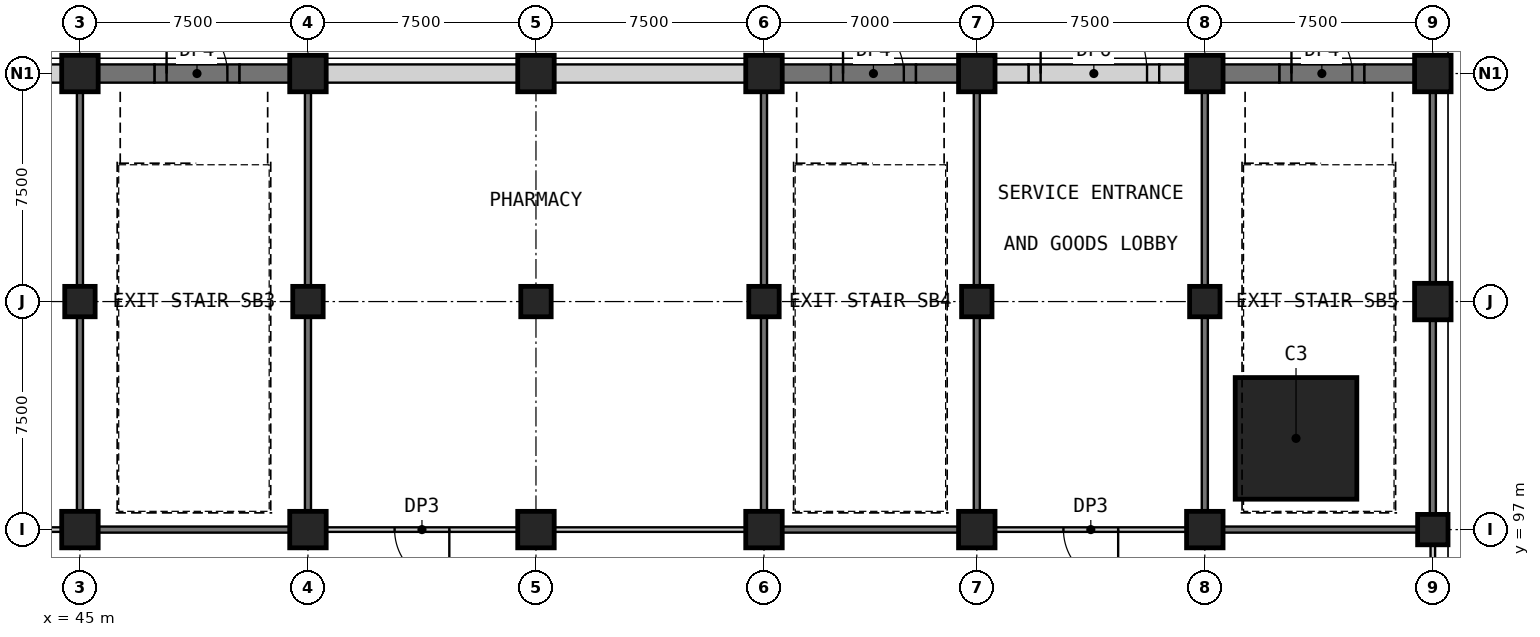
"""IFC4 building model, lengths in metres.
Left out: names, types, materials, properties, quantities, classifications, styles, units other than length and angle.
Written with IfcOpenShell. Run it as: python <this file> out.ifc"""

import sys

from ifc_helpers import new_model, si_unit, direction, frame, frame_2d, origin, origin_2d, place, context, subcontext, project, spatial, rectangle, extrude, element, fill, save


model = new_model("IFC4")
c1 = context("Model", 3, precision=1e-05, world=origin(), true_north=direction((0.0, 1.0)))
c2 = subcontext(c1, "Body", "Model", "MODEL_VIEW")
j1 = project(units=[si_unit("LENGTHUNIT", "METRE"), si_unit("PLANEANGLEUNIT", "RADIAN")], contexts=[c1])
p1 = place(None, origin())
s1 = spatial("IfcSite", under=j1, at=p1, CompositionType="ELEMENT")
p2 = place(p1, origin())
s2 = spatial("IfcBuilding", under=s1, at=p2, CompositionType="ELEMENT")
p3 = place(p2, origin())
s3 = spatial("IfcBuildingStorey", under=s2, at=p3, CompositionType="ELEMENT", Elevation=0.0)
p4 = place(p3, frame((45.0, 97.0, 0.0), z_axis=(0.0, 0.0, 1.0), x_axis=(1.0, 0.0, 0.0)))
e1 = element("IfcColumn", 1, at=p4, inside=s3, PredefinedType="COLUMN", context=c2, shape_type="SweptSolid", body=[
    extrude(rectangle(XDim=1.2, YDim=1.2, at=origin_2d()), origin(), (0.0, 0.0, 1.0), 8.0),
])
p5 = place(p3, frame((45.0, 104.5, 0.0), z_axis=(0.0, 0.0, 1.0), x_axis=(1.0, 0.0, 0.0)))
e2 = element("IfcColumn", 2, at=p5, inside=s3, PredefinedType="COLUMN", context=c2, shape_type="SweptSolid", body=[
    extrude(rectangle(XDim=1.0, YDim=1.0, at=origin_2d()), origin(), (0.0, 0.0, 1.0), 8.0),
])
p6 = place(p3, frame((52.5, 97.0, 0.0), z_axis=(0.0, 0.0, 1.0), x_axis=(1.0, 0.0, 0.0)))
e3 = element("IfcColumn", 3, at=p6, inside=s3, PredefinedType="COLUMN", context=c2, shape_type="SweptSolid", body=[
    extrude(rectangle(XDim=1.2, YDim=1.2, at=origin_2d()), origin(), (0.0, 0.0, 1.0), 8.0),
])
p7 = place(p3, frame((52.5, 104.5, 0.0), z_axis=(0.0, 0.0, 1.0), x_axis=(1.0, 0.0, 0.0)))
e4 = element("IfcColumn", 4, at=p7, inside=s3, PredefinedType="COLUMN", context=c2, shape_type="SweptSolid", body=[
    extrude(rectangle(XDim=1.0, YDim=1.0, at=origin_2d()), origin(), (0.0, 0.0, 1.0), 8.0),
])
p8 = place(p3, frame((60.0, 97.0, 0.0), z_axis=(0.0, 0.0, 1.0), x_axis=(1.0, 0.0, 0.0)))
e5 = element("IfcColumn", 5, at=p8, inside=s3, PredefinedType="COLUMN", context=c2, shape_type="SweptSolid", body=[
    extrude(rectangle(XDim=1.2, YDim=1.2, at=origin_2d()), origin(), (0.0, 0.0, 1.0), 8.0),
])
p9 = place(p3, frame((60.0, 104.5, 0.0), z_axis=(0.0, 0.0, 1.0), x_axis=(1.0, 0.0, 0.0)))
e6 = element("IfcColumn", 6, at=p9, inside=s3, PredefinedType="COLUMN", context=c2, shape_type="SweptSolid", body=[
    extrude(rectangle(XDim=1.0, YDim=1.0, at=origin_2d()), origin(), (0.0, 0.0, 1.0), 8.0),
])
p10 = place(p3, frame((67.5, 97.0, 0.0), z_axis=(0.0, 0.0, 1.0), x_axis=(1.0, 0.0, 0.0)))
e7 = element("IfcColumn", 7, at=p10, inside=s3, PredefinedType="COLUMN", context=c2, shape_type="SweptSolid", body=[
    extrude(rectangle(XDim=1.2, YDim=1.2, at=origin_2d()), origin(), (0.0, 0.0, 1.0), 8.0),
])
p11 = place(p3, frame((67.5, 104.5, 0.0), z_axis=(0.0, 0.0, 1.0), x_axis=(1.0, 0.0, 0.0)))
e8 = element("IfcColumn", 8, at=p11, inside=s3, PredefinedType="COLUMN", context=c2, shape_type="SweptSolid", body=[
    extrude(rectangle(XDim=1.0, YDim=1.0, at=origin_2d()), origin(), (0.0, 0.0, 1.0), 8.0),
])
p12 = place(p3, frame((74.5, 97.0, 0.0), z_axis=(0.0, 0.0, 1.0), x_axis=(1.0, 0.0, 0.0)))
e9 = element("IfcColumn", 9, at=p12, inside=s3, PredefinedType="COLUMN", context=c2, shape_type="SweptSolid", body=[
    extrude(rectangle(XDim=1.2, YDim=1.2, at=origin_2d()), origin(), (0.0, 0.0, 1.0), 8.0),
])
p13 = place(p3, frame((74.5, 104.5, 0.0), z_axis=(0.0, 0.0, 1.0), x_axis=(1.0, 0.0, 0.0)))
e10 = element("IfcColumn", 10, at=p13, inside=s3, PredefinedType="COLUMN", context=c2, shape_type="SweptSolid", body=[
    extrude(rectangle(XDim=1.0, YDim=1.0, at=origin_2d()), origin(), (0.0, 0.0, 1.0), 8.0),
])
p14 = place(p3, frame((82.0, 97.0, 0.0), z_axis=(0.0, 0.0, 1.0), x_axis=(1.0, 0.0, 0.0)))
e11 = element("IfcColumn", 11, at=p14, inside=s3, PredefinedType="COLUMN", context=c2, shape_type="SweptSolid", body=[
    extrude(rectangle(XDim=1.2, YDim=1.2, at=origin_2d()), origin(), (0.0, 0.0, 1.0), 8.0),
])
for number, where, z_axis, x_axis in (
    (12, (82.0, 104.5, 0.0), (0.0, 0.0, 1.0), (1.0, 0.0, 0.0)),
    (13, (89.5, 97.0, 0.0), (0.0, 0.0, 1.0), (1.0, 0.0, 0.0)),
):
    element("IfcColumn", number, at=place(p3, frame(where, z_axis=z_axis, x_axis=x_axis)), inside=s3, PredefinedType="COLUMN", context=c2, shape_type="SweptSolid", body=[
        extrude(rectangle(XDim=1.0, YDim=1.0, at=origin_2d()), origin(), (0.0, 0.0, 1.0), 8.0),
    ])
p15 = place(p3, frame((85.0, 100.0, 0.0), z_axis=(0.0, 0.0, 1.0), x_axis=(1.0, 0.0, 0.0)))
e14 = element("IfcColumn", 14, at=p15, inside=s3, PredefinedType="COLUMN", context=c2, shape_type="SweptSolid", body=[
    extrude(rectangle(XDim=4.0, YDim=4.0, at=origin_2d()), origin(), (0.0, 0.0, 1.0), 8.0),
])
for number, where, z_axis, x_axis in (
    (15, (45.0, 112.0, 0.0), (0.0, 0.0, 1.0), (1.0, 0.0, 0.0)),
    (16, (52.5, 112.0, 0.0), (0.0, 0.0, 1.0), (1.0, 0.0, 0.0)),
    (17, (60.0, 112.0, 0.0), (0.0, 0.0, 1.0), (1.0, 0.0, 0.0)),
    (18, (67.5, 112.0, 0.0), (0.0, 0.0, 1.0), (1.0, 0.0, 0.0)),
    (19, (74.5, 112.0, 0.0), (0.0, 0.0, 1.0), (1.0, 0.0, 0.0)),
    (20, (82.0, 112.0, 0.0), (0.0, 0.0, 1.0), (1.0, 0.0, 0.0)),
    (21, (89.5, 104.5, 0.0), (0.0, 0.0, 1.0), (1.0, 0.0, 0.0)),
    (22, (89.5, 112.0, 0.0), (0.0, 0.0, 1.0), (1.0, 0.0, 0.0)),
):
    element("IfcColumn", number, at=place(p3, frame(where, z_axis=z_axis, x_axis=x_axis)), inside=s3, PredefinedType="COLUMN", context=c2, shape_type="SweptSolid", body=[
        extrude(rectangle(XDim=1.2, YDim=1.2, at=origin_2d()), origin(), (0.0, 0.0, 1.0), 8.0),
    ])
p16 = place(p3, frame((44.4, 97.0, 0.0), z_axis=(0.0, 0.0, 1.0), x_axis=(-1.0, 0.0, 0.0)))
e23 = element("IfcWall", 23, at=p16, inside=s3, PredefinedType="PARTITIONING", context=c2, shape_type="SweptSolid", body=[
    extrude(rectangle(XDim=6.3, YDim=0.15, at=frame_2d((3.15, 0.0))), origin(), (0.0, 0.0, 1.0), 7.7),
])
p17 = place(p16, frame((2.25, 0.0, 0.0)))
e24 = element("IfcOpeningElement", 24, at=p17, cuts=e23, PredefinedType="OPENING", context=c2, shape_type="SweptSolid", body=[
    extrude(rectangle(XDim=1.8, YDim=2.4, at=frame_2d((0.9, 1.2))), frame((0.0, 0.085, 0.0), z_axis=(0.0, -1.0, 0.0), x_axis=(1.0, 0.0, 0.0)), (0.0, 0.0, 1.0), 0.17),
])
p18 = place(p3, frame((45.6, 97.0, 0.0), z_axis=(0.0, 0.0, 1.0), x_axis=(1.0, 0.0, 0.0)))
e25 = element("IfcWall", 25, at=p18, inside=s3, PredefinedType="SHEAR", context=c2, shape_type="SweptSolid", body=[
    extrude(rectangle(XDim=6.3, YDim=0.2, at=frame_2d((3.15, 0.0))), origin(), (0.0, 0.0, 1.0), 7.7),
])
p19 = place(p3, frame((59.4, 97.0, 0.0), z_axis=(0.0, 0.0, 1.0), x_axis=(-1.0, 0.0, 0.0)))
e26 = element("IfcWall", 26, at=p19, inside=s3, PredefinedType="PARTITIONING", context=c2, shape_type="SweptSolid", body=[
    extrude(rectangle(XDim=6.3, YDim=0.15, at=frame_2d((3.15, 0.0))), origin(), (0.0, 0.0, 1.0), 7.7),
])
p20 = place(p19, frame((2.25, 0.0, 0.0)))
e27 = element("IfcOpeningElement", 27, at=p20, cuts=e26, PredefinedType="OPENING", context=c2, shape_type="SweptSolid", body=[
    extrude(rectangle(XDim=1.8, YDim=2.4, at=frame_2d((0.9, 1.2))), frame((0.0, 0.085, 0.0), z_axis=(0.0, -1.0, 0.0), x_axis=(1.0, 0.0, 0.0)), (0.0, 0.0, 1.0), 0.17),
])
p21 = place(p3, frame((60.6, 97.0, 0.0), z_axis=(0.0, 0.0, 1.0), x_axis=(1.0, 0.0, 0.0)))
e28 = element("IfcWall", 28, at=p21, inside=s3, PredefinedType="PARTITIONING", context=c2, shape_type="SweptSolid", body=[
    extrude(rectangle(XDim=6.3, YDim=0.15, at=frame_2d((3.15, 0.0))), origin(), (0.0, 0.0, 1.0), 7.7),
])
p22 = place(p3, frame((68.1, 97.0, 0.0), z_axis=(0.0, 0.0, 1.0), x_axis=(1.0, 0.0, 0.0)))
e29 = element("IfcWall", 29, at=p22, inside=s3, PredefinedType="SHEAR", context=c2, shape_type="SweptSolid", body=[
    extrude(rectangle(XDim=5.8, YDim=0.2, at=frame_2d((2.9, 0.0))), origin(), (0.0, 0.0, 1.0), 7.7),
])
p23 = place(p3, frame((81.4, 97.0, 0.0), z_axis=(0.0, 0.0, 1.0), x_axis=(-1.0, 0.0, 0.0)))
e30 = element("IfcWall", 30, at=p23, inside=s3, PredefinedType="PARTITIONING", context=c2, shape_type="SweptSolid", body=[
    extrude(rectangle(XDim=6.3, YDim=0.15, at=frame_2d((3.15, 0.0))), origin(), (0.0, 0.0, 1.0), 7.7),
])
p24 = place(p23, frame((2.25, 0.0, 0.0)))
e31 = element("IfcOpeningElement", 31, at=p24, cuts=e30, PredefinedType="OPENING", context=c2, shape_type="SweptSolid", body=[
    extrude(rectangle(XDim=1.8, YDim=2.4, at=frame_2d((0.9, 1.2))), frame((0.0, 0.085, 0.0), z_axis=(0.0, -1.0, 0.0), x_axis=(1.0, 0.0, 0.0)), (0.0, 0.0, 1.0), 0.17),
])
p25 = place(p3, frame((82.6, 97.0, 0.0), z_axis=(0.0, 0.0, 1.0), x_axis=(1.0, 0.0, 0.0)))
e32 = element("IfcWall", 32, at=p25, inside=s3, PredefinedType="SHEAR", context=c2, shape_type="SweptSolid", body=[
    extrude(rectangle(XDim=6.4, YDim=0.2, at=frame_2d((3.2, 0.0))), origin(), (0.0, 0.0, 1.0), 7.7),
])
p26 = place(p3, frame((38.1, 112.0, 0.0), z_axis=(0.0, 0.0, 1.0), x_axis=(1.0, 0.0, 0.0)))
e33 = element("IfcWall", 33, at=p26, inside=s3, PredefinedType="PARTITIONING", context=c2, shape_type="SweptSolid", body=[
    extrude(rectangle(XDim=6.3, YDim=0.6, at=frame_2d((3.15, 0.0))), origin(), (0.0, 0.0, 1.0), 7.1),
])
p27 = place(p3, frame((47.45, 112.0, 0.0), z_axis=(0.0, 0.0, 1.0), x_axis=(1.0, 0.0, 0.0)))
e34 = element("IfcWall", 34, at=p27, inside=s3, PredefinedType="PARTITIONING", context=c2, shape_type="SweptSolid", body=[
    extrude(rectangle(XDim=2.8, YDim=0.6, at=frame_2d((1.4, 0.0))), origin(), (0.0, 0.0, 1.0), 7.1),
])
p28 = place(p27, frame((0.4, 0.0, 0.0)))
e35 = element("IfcOpeningElement", 35, at=p28, cuts=e34, PredefinedType="OPENING", context=c2, shape_type="SweptSolid", body=[
    extrude(rectangle(XDim=2.0, YDim=2.4, at=frame_2d((1.0, 1.2))), frame((0.0, 0.31, 0.0), z_axis=(0.0, -1.0, 0.0), x_axis=(1.0, 0.0, 0.0)), (0.0, 0.0, 1.0), 0.62),
])
p29 = place(p3, frame((45.6, 112.0, 0.0), z_axis=(0.0, 0.0, 1.0), x_axis=(1.0, 0.0, 0.0)))
e36 = element("IfcWall", 36, at=p29, inside=s3, PredefinedType="PARTITIONING", context=c2, shape_type="SweptSolid", body=[
    extrude(rectangle(XDim=1.85, YDim=0.6, at=frame_2d((0.925, 0.0))), origin(), (0.0, 0.0, 1.0), 7.1),
])
p30 = place(p3, frame((50.25, 112.0, 0.0), z_axis=(0.0, 0.0, 1.0), x_axis=(1.0, 0.0, 0.0)))
e37 = element("IfcWall", 37, at=p30, inside=s3, PredefinedType="PARTITIONING", context=c2, shape_type="SweptSolid", body=[
    extrude(rectangle(XDim=1.65, YDim=0.6, at=frame_2d((0.825, 0.0))), origin(), (0.0, 0.0, 1.0), 7.1),
])
for number, where, z_axis, x_axis in (
    (38, (53.1, 112.0, 0.0), (0.0, 0.0, 1.0), (1.0, 0.0, 0.0)),
    (39, (60.6, 112.0, 0.0), (0.0, 0.0, 1.0), (1.0, 0.0, 0.0)),
):
    element("IfcWall", number, at=place(p3, frame(where, z_axis=z_axis, x_axis=x_axis)), inside=s3, PredefinedType="PARTITIONING", context=c2, shape_type="SweptSolid", body=[
        extrude(rectangle(XDim=6.3, YDim=0.6, at=frame_2d((3.15, 0.0))), origin(), (0.0, 0.0, 1.0), 7.1),
    ])
p31 = place(p3, frame((69.7, 112.0, 0.0), z_axis=(0.0, 0.0, 1.0), x_axis=(1.0, 0.0, 0.0)))
e40 = element("IfcWall", 40, at=p31, inside=s3, PredefinedType="PARTITIONING", context=c2, shape_type="SweptSolid", body=[
    extrude(rectangle(XDim=2.8, YDim=0.6, at=frame_2d((1.4, 0.0))), origin(), (0.0, 0.0, 1.0), 7.1),
])
p32 = place(p31, frame((0.4, 0.0, 0.0)))
e41 = element("IfcOpeningElement", 41, at=p32, cuts=e40, PredefinedType="OPENING", context=c2, shape_type="SweptSolid", body=[
    extrude(rectangle(XDim=2.0, YDim=2.4, at=frame_2d((1.0, 1.2))), frame((0.0, 0.31, 0.0), z_axis=(0.0, -1.0, 0.0), x_axis=(1.0, 0.0, 0.0)), (0.0, 0.0, 1.0), 0.62),
])
p33 = place(p3, frame((68.1, 112.0, 0.0), z_axis=(0.0, 0.0, 1.0), x_axis=(1.0, 0.0, 0.0)))
e42 = element("IfcWall", 42, at=p33, inside=s3, PredefinedType="PARTITIONING", context=c2, shape_type="SweptSolid", body=[
    extrude(rectangle(XDim=1.6, YDim=0.6, at=frame_2d((0.8, 0.0))), origin(), (0.0, 0.0, 1.0), 7.1),
])
p34 = place(p3, frame((72.5, 112.0, 0.0), z_axis=(0.0, 0.0, 1.0), x_axis=(1.0, 0.0, 0.0)))
e43 = element("IfcWall", 43, at=p34, inside=s3, PredefinedType="PARTITIONING", context=c2, shape_type="SweptSolid", body=[
    extrude(rectangle(XDim=1.4, YDim=0.6, at=frame_2d((0.7, 0.0))), origin(), (0.0, 0.0, 1.0), 7.1),
])
p35 = place(p3, frame((76.2, 112.0, 0.0), z_axis=(0.0, 0.0, 1.0), x_axis=(1.0, 0.0, 0.0)))
e44 = element("IfcWall", 44, at=p35, inside=s3, PredefinedType="PARTITIONING", context=c2, shape_type="SweptSolid", body=[
    extrude(rectangle(XDim=4.3, YDim=0.6, at=frame_2d((2.15, 0.0))), origin(), (0.0, 0.0, 1.0), 7.1),
])
p36 = place(p35, frame((0.4, 0.0, 0.0)))
e45 = element("IfcOpeningElement", 45, at=p36, cuts=e44, PredefinedType="OPENING", context=c2, shape_type="SweptSolid", body=[
    extrude(rectangle(XDim=3.5, YDim=4.5, at=frame_2d((1.75, 2.25))), frame((0.0, 0.31, 0.0), z_axis=(0.0, -1.0, 0.0), x_axis=(1.0, 0.0, 0.0)), (0.0, 0.0, 1.0), 0.62),
])
p37 = place(p3, frame((75.1, 112.0, 0.0), z_axis=(0.0, 0.0, 1.0), x_axis=(1.0, 0.0, 0.0)))
e46 = element("IfcWall", 46, at=p37, inside=s3, PredefinedType="PARTITIONING", context=c2, shape_type="SweptSolid", body=[
    extrude(rectangle(XDim=1.1, YDim=0.6, at=frame_2d((0.55, 0.0))), origin(), (0.0, 0.0, 1.0), 7.1),
])
p38 = place(p3, frame((80.5, 112.0, 0.0), z_axis=(0.0, 0.0, 1.0), x_axis=(1.0, 0.0, 0.0)))
e47 = element("IfcWall", 47, at=p38, inside=s3, PredefinedType="PARTITIONING", context=c2, shape_type="SweptSolid", body=[
    extrude(rectangle(XDim=0.9, YDim=0.6, at=frame_2d((0.45, 0.0))), origin(), (0.0, 0.0, 1.0), 7.1),
])
p39 = place(p3, frame((84.45, 112.0, 0.0), z_axis=(0.0, 0.0, 1.0), x_axis=(1.0, 0.0, 0.0)))
e48 = element("IfcWall", 48, at=p39, inside=s3, PredefinedType="PARTITIONING", context=c2, shape_type="SweptSolid", body=[
    extrude(rectangle(XDim=2.8, YDim=0.6, at=frame_2d((1.4, 0.0))), origin(), (0.0, 0.0, 1.0), 7.1),
])
p40 = place(p39, frame((0.4, 0.0, 0.0)))
e49 = element("IfcOpeningElement", 49, at=p40, cuts=e48, PredefinedType="OPENING", context=c2, shape_type="SweptSolid", body=[
    extrude(rectangle(XDim=2.0, YDim=2.4, at=frame_2d((1.0, 1.2))), frame((0.0, 0.31, 0.0), z_axis=(0.0, -1.0, 0.0), x_axis=(1.0, 0.0, 0.0)), (0.0, 0.0, 1.0), 0.62),
])
p41 = place(p3, frame((82.6, 112.0, 0.0), z_axis=(0.0, 0.0, 1.0), x_axis=(1.0, 0.0, 0.0)))
e50 = element("IfcWall", 50, at=p41, inside=s3, PredefinedType="PARTITIONING", context=c2, shape_type="SweptSolid", body=[
    extrude(rectangle(XDim=1.85, YDim=0.6, at=frame_2d((0.925, 0.0))), origin(), (0.0, 0.0, 1.0), 7.1),
])
p42 = place(p3, frame((87.25, 112.0, 0.0), z_axis=(0.0, 0.0, 1.0), x_axis=(1.0, 0.0, 0.0)))
e51 = element("IfcWall", 51, at=p42, inside=s3, PredefinedType="PARTITIONING", context=c2, shape_type="SweptSolid", body=[
    extrude(rectangle(XDim=1.65, YDim=0.6, at=frame_2d((0.825, 0.0))), origin(), (0.0, 0.0, 1.0), 7.1),
])
for number, where, z_axis, x_axis in (
    (52, (52.5, 97.6, 0.0), (0.0, 0.0, 1.0), (0.0, 1.0, 0.0)),
    (53, (52.5, 105.0, 0.0), (0.0, 0.0, 1.0), (0.0, 1.0, 0.0)),
    (54, (45.0, 97.6, 0.0), (0.0, 0.0, 1.0), (0.0, 1.0, 0.0)),
    (55, (45.0, 105.0, 0.0), (0.0, 0.0, 1.0), (0.0, 1.0, 0.0)),
):
    element("IfcWall", number, at=place(p3, frame(where, z_axis=z_axis, x_axis=x_axis)), inside=s3, PredefinedType="SHEAR", context=c2, shape_type="SweptSolid", body=[
        extrude(rectangle(XDim=6.4, YDim=0.2, at=frame_2d((3.2, 0.0))), origin(), (0.0, 0.0, 1.0), 7.7),
    ])
p43 = place(p3, frame((89.5, 96.5, 0.0), z_axis=(0.0, 0.0, 1.0), x_axis=(0.0, -1.0, 0.0)))
e56 = element("IfcWall", 56, at=p43, inside=s3, PredefinedType="PARTITIONING", context=c2, shape_type="SweptSolid", body=[
    extrude(rectangle(XDim=6.0, YDim=0.15, at=frame_2d((3.0, 0.0))), origin(), (0.0, 0.0, 1.0), 7.7),
])
p44 = place(p43, frame((2.2, 0.0, 0.0)))
e57 = element("IfcOpeningElement", 57, at=p44, cuts=e56, PredefinedType="OPENING", context=c2, shape_type="SweptSolid", body=[
    extrude(rectangle(XDim=1.8, YDim=2.4, at=frame_2d((0.9, 1.2))), frame((0.0, 0.085, 0.0), z_axis=(0.0, -1.0, 0.0), x_axis=(1.0, 0.0, 0.0)), (0.0, 0.0, 1.0), 0.17),
])
p45 = place(p3, frame((89.5, 97.5, 0.0), z_axis=(0.0, 0.0, 1.0), x_axis=(0.0, 1.0, 0.0)))
e58 = element("IfcWall", 58, at=p45, inside=s3, PredefinedType="SHEAR", context=c2, shape_type="SweptSolid", body=[
    extrude(rectangle(XDim=6.4, YDim=0.2, at=frame_2d((3.2, 0.0))), origin(), (0.0, 0.0, 1.0), 7.7),
])
p46 = place(p3, frame((89.5, 105.1, 0.0), z_axis=(0.0, 0.0, 1.0), x_axis=(0.0, 1.0, 0.0)))
e59 = element("IfcWall", 59, at=p46, inside=s3, PredefinedType="SHEAR", context=c2, shape_type="SweptSolid", body=[
    extrude(rectangle(XDim=6.3, YDim=0.2, at=frame_2d((3.15, 0.0))), origin(), (0.0, 0.0, 1.0), 7.7),
])
for number, where, z_axis, x_axis in (
    (60, (67.5, 97.6, 0.0), (0.0, 0.0, 1.0), (0.0, 1.0, 0.0)),
    (61, (67.5, 105.0, 0.0), (0.0, 0.0, 1.0), (0.0, 1.0, 0.0)),
    (62, (74.5, 97.6, 0.0), (0.0, 0.0, 1.0), (0.0, 1.0, 0.0)),
    (63, (74.5, 105.0, 0.0), (0.0, 0.0, 1.0), (0.0, 1.0, 0.0)),
    (64, (82.0, 97.6, 0.0), (0.0, 0.0, 1.0), (0.0, 1.0, 0.0)),
    (65, (82.0, 105.0, 0.0), (0.0, 0.0, 1.0), (0.0, 1.0, 0.0)),
):
    element("IfcWall", number, at=place(p3, frame(where, z_axis=z_axis, x_axis=x_axis)), inside=s3, PredefinedType="SHEAR", context=c2, shape_type="SweptSolid", body=[
        extrude(rectangle(XDim=6.4, YDim=0.2, at=frame_2d((3.2, 0.0))), origin(), (0.0, 0.0, 1.0), 7.7),
    ])
p47 = place(p20, origin())
e66 = element("IfcDoor", 66, at=p47, inside=s3, OperationType="SINGLE_SWING_LEFT", PredefinedType="DOOR", context=c2, shape_type="SweptSolid", body=[
    extrude(rectangle(XDim=1.8, YDim=2.4, at=frame_2d((0.9, 1.2))), frame((0.0, 0.025, 0.0), z_axis=(0.0, -1.0, 0.0), x_axis=(1.0, 0.0, 0.0)), (0.0, 0.0, 1.0), 0.05),
])
fill(e27, e66)
p48 = place(p24, origin())
e67 = element("IfcDoor", 67, at=p48, inside=s3, OperationType="SINGLE_SWING_LEFT", PredefinedType="DOOR", context=c2, shape_type="SweptSolid", body=[
    extrude(rectangle(XDim=1.8, YDim=2.4, at=frame_2d((0.9, 1.2))), frame((0.0, 0.025, 0.0), z_axis=(0.0, -1.0, 0.0), x_axis=(1.0, 0.0, 0.0)), (0.0, 0.0, 1.0), 0.05),
])
fill(e31, e67)
p49 = place(p28, origin())
e68 = element("IfcDoor", 68, at=p49, inside=s3, OperationType="SINGLE_SWING_LEFT", PredefinedType="DOOR", context=c2, shape_type="SweptSolid", body=[
    extrude(rectangle(XDim=2.0, YDim=2.4, at=frame_2d((1.0, 1.2))), frame((0.0, 0.025, 0.0), z_axis=(0.0, -1.0, 0.0), x_axis=(1.0, 0.0, 0.0)), (0.0, 0.0, 1.0), 0.05),
])
fill(e35, e68)
p50 = place(p32, origin())
e69 = element("IfcDoor", 69, at=p50, inside=s3, OperationType="SINGLE_SWING_LEFT", PredefinedType="DOOR", context=c2, shape_type="SweptSolid", body=[
    extrude(rectangle(XDim=2.0, YDim=2.4, at=frame_2d((1.0, 1.2))), frame((0.0, 0.025, 0.0), z_axis=(0.0, -1.0, 0.0), x_axis=(1.0, 0.0, 0.0)), (0.0, 0.0, 1.0), 0.05),
])
fill(e41, e69)
p51 = place(p36, origin())
e70 = element("IfcDoor", 70, at=p51, inside=s3, OperationType="SINGLE_SWING_LEFT", PredefinedType="DOOR", context=c2, shape_type="SweptSolid", body=[
    extrude(rectangle(XDim=3.5, YDim=4.5, at=frame_2d((1.75, 2.25))), frame((0.0, 0.025, 0.0), z_axis=(0.0, -1.0, 0.0), x_axis=(1.0, 0.0, 0.0)), (0.0, 0.0, 1.0), 0.05),
])
fill(e45, e70)
p52 = place(p40, origin())
e71 = element("IfcDoor", 71, at=p52, inside=s3, OperationType="SINGLE_SWING_LEFT", PredefinedType="DOOR", context=c2, shape_type="SweptSolid", body=[
    extrude(rectangle(XDim=2.0, YDim=2.4, at=frame_2d((1.0, 1.2))), frame((0.0, 0.025, 0.0), z_axis=(0.0, -1.0, 0.0), x_axis=(1.0, 0.0, 0.0)), (0.0, 0.0, 1.0), 0.05),
])
fill(e49, e71)
save(model, sys.argv[1])
